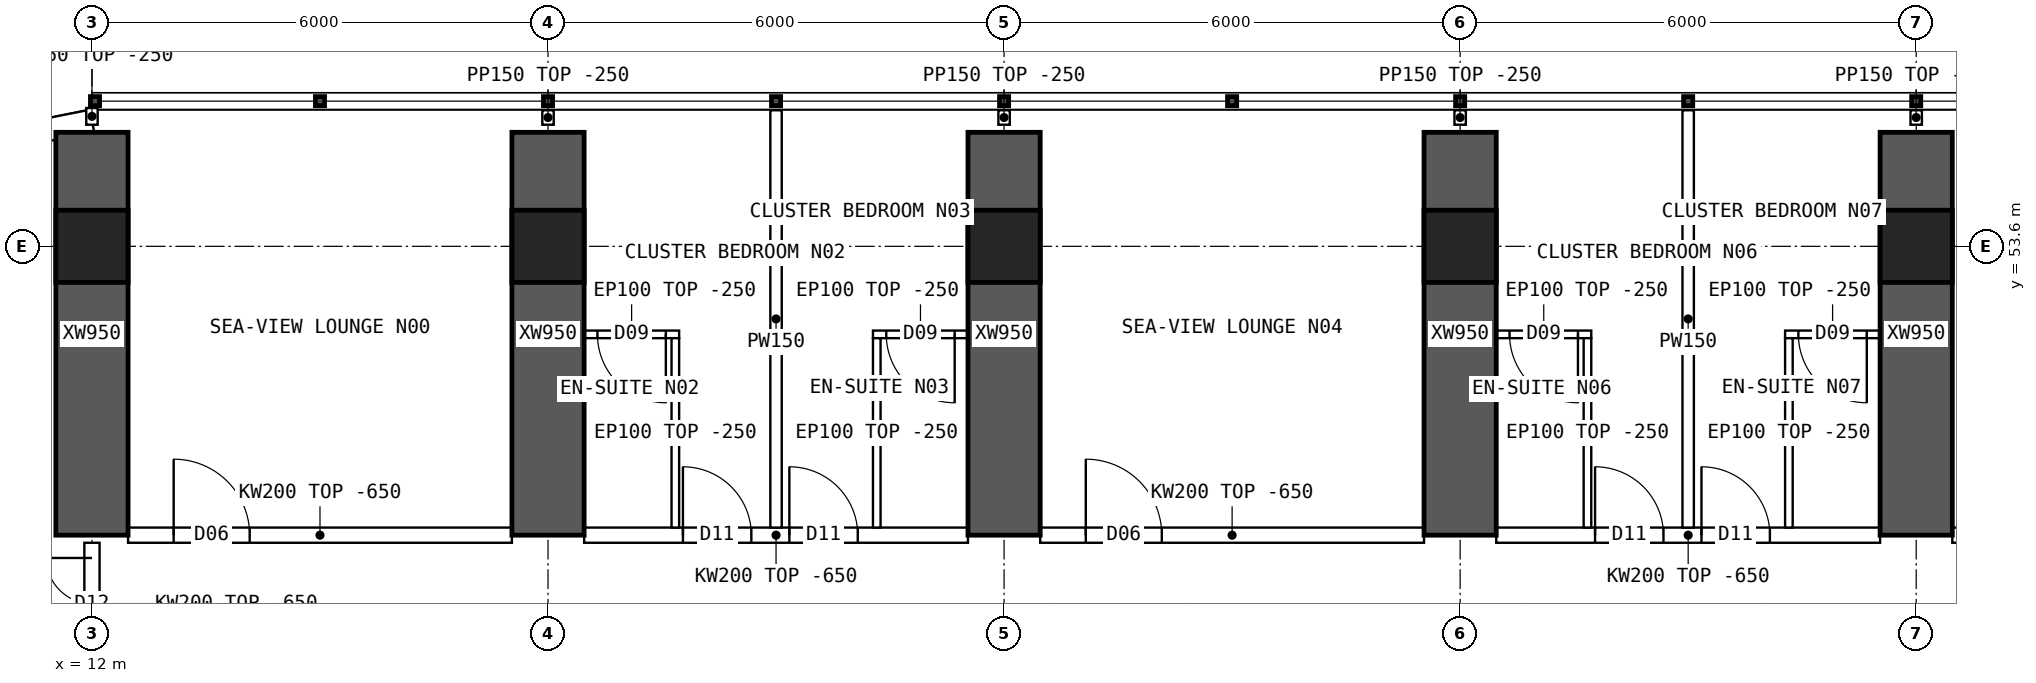
"""IFC4 building model, lengths in metres.
Left out: names, types, materials, properties, quantities, classifications, styles, units other than length and angle.
Written with IfcOpenShell. Run it as: python <this file> out.ifc"""

import sys

from ifc_helpers import new_model, si_unit, direction, frame, frame_2d, origin, origin_2d, place, context, subcontext, project, spatial, polyline, rectangle, hollow_rectangle, outline, extrude, element, fill, save


model = new_model("IFC4")
c1 = context("Model", 3, precision=1e-05, world=origin(), true_north=direction((0.0, 1.0)))
c2 = subcontext(c1, "Body", "Model", "MODEL_VIEW")
j1 = project(units=[si_unit("LENGTHUNIT", "METRE"), si_unit("PLANEANGLEUNIT", "RADIAN")], contexts=[c1])
p1 = place(None, origin())
s1 = spatial("IfcSite", under=j1, at=p1, CompositionType="ELEMENT")
p2 = place(p1, origin())
s2 = spatial("IfcBuilding", under=s1, at=p2, CompositionType="ELEMENT")
p3 = place(p2, frame((0.0, 0.0, 125.65)))
s3 = spatial("IfcBuildingStorey", under=s2, at=p3, CompositionType="ELEMENT", Elevation=125.65)
for number, where, z_axis, x_axis in (
    (1, (12.0, 53.6, 0.0), (0.0, 0.0, 1.0), (1.0, 0.0, 0.0)),
    (2, (18.0, 53.6, 0.0), (0.0, 0.0, 1.0), (1.0, 0.0, 0.0)),
    (3, (24.0, 53.6, 0.0), (0.0, 0.0, 1.0), (1.0, 0.0, 0.0)),
    (4, (30.0, 53.6, 0.0), (0.0, 0.0, 1.0), (1.0, 0.0, 0.0)),
    (5, (36.0, 53.6, 0.0), (0.0, 0.0, 1.0), (1.0, 0.0, 0.0)),
):
    element("IfcColumn", number, at=place(p3, frame(where, z_axis=z_axis, x_axis=x_axis)), inside=s3, PredefinedType="COLUMN", context=c2, shape_type="SweptSolid", body=[
        extrude(hollow_rectangle(XDim=0.95, YDim=0.95, WallThickness=0.095, at=origin_2d()), origin(), (0.0, 0.0, 1.0), 3.75),
    ])
for number, where, z_axis, x_axis in (
    (6, (12.0, 49.8, 0.0), (0.0, 0.0, 1.0), (0.0, 1.0, 0.0)),
    (7, (18.0, 49.8, 0.0), (0.0, 0.0, 1.0), (0.0, 1.0, 0.0)),
    (8, (24.0, 49.8, 0.0), (0.0, 0.0, 1.0), (0.0, 1.0, 0.0)),
    (9, (30.0, 49.8, 0.0), (0.0, 0.0, 1.0), (0.0, 1.0, 0.0)),
    (10, (36.0, 49.8, 0.0), (0.0, 0.0, 1.0), (0.0, 1.0, 0.0)),
):
    element("IfcWall", number, at=place(p3, frame(where, z_axis=z_axis, x_axis=x_axis)), inside=s3, PredefinedType="SHEAR", context=c2, shape_type="SweptSolid", body=[
        extrude(rectangle(XDim=5.3, YDim=0.95, at=frame_2d((2.65, 0.0))), origin(), (0.0, 0.0, 1.0), 3.75),
    ])
p4 = place(p3, frame((12.0, 55.25, 0.0), z_axis=(0.0, 0.0, 1.0), x_axis=(-0.980787251524, -0.195080412259, 0.0)))
e11 = element("IfcWall", 11, at=p4, inside=s3, PredefinedType="SOLIDWALL", context=c2, shape_type="SweptSolid", body=[
    extrude(outline(polyline([(-0.03, -0.15), (3.249, -0.15), (3.189, 0.15), (0.03, 0.15), (-0.03, -0.15)])), origin(), (0.0, 0.0, 1.0), 3.5),
])
p5 = place(p4, frame((0.909, 0.0, 0.9)))
e12 = element("IfcOpeningElement", 12, at=p5, cuts=e11, PredefinedType="OPENING", context=c2, shape_type="SweptSolid", body=[
    extrude(rectangle(XDim=1.4, YDim=1.8, at=frame_2d((0.7, 0.9))), frame((0.0, 0.16, 0.0), z_axis=(0.0, -1.0, 0.0), x_axis=(1.0, 0.0, 0.0)), (0.0, 0.0, 1.0), 0.32),
])
p6 = place(p3, frame((12.475, 49.8, 0.0), z_axis=(0.0, 0.0, 1.0), x_axis=(1.0, 0.0, 0.0)))
e13 = element("IfcWall", 13, at=p6, inside=s3, PredefinedType="SOLIDWALL", context=c2, shape_type="SweptSolid", body=[
    extrude(outline(polyline([(0.0, 0.0), (5.05, 0.0), (5.05, 3.1), (0.0, 3.1), (0.0, 0.0)])), frame((0.0, 0.1, 0.0), z_axis=(0.0, -1.0, 0.0), x_axis=(1.0, 0.0, 0.0)), (0.0, 0.0, 1.0), 0.2),
])
p7 = place(p6, frame((0.6, 0.0, 0.0)))
e14 = element("IfcOpeningElement", 14, at=p7, cuts=e13, PredefinedType="OPENING", context=c2, shape_type="SweptSolid", body=[
    extrude(rectangle(XDim=1.0, YDim=2.1, at=frame_2d((0.5, 1.05))), frame((0.0, 0.11, 0.0), z_axis=(0.0, -1.0, 0.0), x_axis=(1.0, 0.0, 0.0)), (0.0, 0.0, 1.0), 0.22),
])
p8 = place(p3, frame((18.475, 49.8, 0.0), z_axis=(0.0, 0.0, 1.0), x_axis=(1.0, 0.0, 0.0)))
e15 = element("IfcWall", 15, at=p8, inside=s3, PredefinedType="SOLIDWALL", context=c2, shape_type="SweptSolid", body=[
    extrude(outline(polyline([(0.0, 0.0), (5.05, 0.0), (5.05, 3.1), (0.0, 3.1), (0.0, 0.0)])), frame((0.0, 0.1, 0.0), z_axis=(0.0, -1.0, 0.0), x_axis=(1.0, 0.0, 0.0)), (0.0, 0.0, 1.0), 0.2),
])
p9 = place(p8, frame((1.3, 0.0, 0.0)))
e16 = element("IfcOpeningElement", 16, at=p9, cuts=e15, PredefinedType="OPENING", context=c2, shape_type="SweptSolid", body=[
    extrude(rectangle(XDim=0.9, YDim=2.1, at=frame_2d((0.45, 1.05))), frame((0.0, 0.11, 0.0), z_axis=(0.0, -1.0, 0.0), x_axis=(1.0, 0.0, 0.0)), (0.0, 0.0, 1.0), 0.22),
])
p10 = place(p8, frame((2.7, 0.0, 0.0)))
e17 = element("IfcOpeningElement", 17, at=p10, cuts=e15, PredefinedType="OPENING", context=c2, shape_type="SweptSolid", body=[
    extrude(rectangle(XDim=0.9, YDim=2.1, at=frame_2d((0.45, 1.05))), frame((0.0, 0.11, 0.0), z_axis=(0.0, -1.0, 0.0), x_axis=(1.0, 0.0, 0.0)), (0.0, 0.0, 1.0), 0.22),
])
p11 = place(p3, frame((24.475, 49.8, 0.0), z_axis=(0.0, 0.0, 1.0), x_axis=(1.0, 0.0, 0.0)))
e18 = element("IfcWall", 18, at=p11, inside=s3, PredefinedType="SOLIDWALL", context=c2, shape_type="SweptSolid", body=[
    extrude(outline(polyline([(0.0, 0.0), (5.05, 0.0), (5.05, 3.1), (0.0, 3.1), (0.0, 0.0)])), frame((0.0, 0.1, 0.0), z_axis=(0.0, -1.0, 0.0), x_axis=(1.0, 0.0, 0.0)), (0.0, 0.0, 1.0), 0.2),
])
p12 = place(p11, frame((0.6, 0.0, 0.0)))
e19 = element("IfcOpeningElement", 19, at=p12, cuts=e18, PredefinedType="OPENING", context=c2, shape_type="SweptSolid", body=[
    extrude(rectangle(XDim=1.0, YDim=2.1, at=frame_2d((0.5, 1.05))), frame((0.0, 0.11, 0.0), z_axis=(0.0, -1.0, 0.0), x_axis=(1.0, 0.0, 0.0)), (0.0, 0.0, 1.0), 0.22),
])
p13 = place(p3, frame((30.475, 49.8, 0.0), z_axis=(0.0, 0.0, 1.0), x_axis=(1.0, 0.0, 0.0)))
e20 = element("IfcWall", 20, at=p13, inside=s3, PredefinedType="SOLIDWALL", context=c2, shape_type="SweptSolid", body=[
    extrude(outline(polyline([(0.0, 0.0), (5.05, 0.0), (5.05, 3.1), (0.0, 3.1), (0.0, 0.0)])), frame((0.0, 0.1, 0.0), z_axis=(0.0, -1.0, 0.0), x_axis=(1.0, 0.0, 0.0)), (0.0, 0.0, 1.0), 0.2),
])
p14 = place(p13, frame((1.3, 0.0, 0.0)))
e21 = element("IfcOpeningElement", 21, at=p14, cuts=e20, PredefinedType="OPENING", context=c2, shape_type="SweptSolid", body=[
    extrude(rectangle(XDim=0.9, YDim=2.1, at=frame_2d((0.45, 1.05))), frame((0.0, 0.11, 0.0), z_axis=(0.0, -1.0, 0.0), x_axis=(1.0, 0.0, 0.0)), (0.0, 0.0, 1.0), 0.22),
])
p15 = place(p13, frame((2.7, 0.0, 0.0)))
e22 = element("IfcOpeningElement", 22, at=p15, cuts=e20, PredefinedType="OPENING", context=c2, shape_type="SweptSolid", body=[
    extrude(rectangle(XDim=0.9, YDim=2.1, at=frame_2d((0.45, 1.05))), frame((0.0, 0.11, 0.0), z_axis=(0.0, -1.0, 0.0), x_axis=(1.0, 0.0, 0.0)), (0.0, 0.0, 1.0), 0.22),
])
p16 = place(p3, frame((36.475, 49.8, 0.0), z_axis=(0.0, 0.0, 1.0), x_axis=(1.0, 0.0, 0.0)))
e23 = element("IfcWall", 23, at=p16, inside=s3, PredefinedType="SOLIDWALL", context=c2, shape_type="SweptSolid", body=[
    extrude(outline(polyline([(0.0, 0.0), (5.05, 0.0), (5.05, 3.1), (0.0, 3.1), (0.0, 0.0)])), frame((0.0, 0.1, 0.0), z_axis=(0.0, -1.0, 0.0), x_axis=(1.0, 0.0, 0.0)), (0.0, 0.0, 1.0), 0.2),
])
p17 = place(p16, frame((0.3, 0.0, 0.0)))
e24 = element("IfcOpeningElement", 24, at=p17, cuts=e23, PredefinedType="OPENING", context=c2, shape_type="SweptSolid", body=[
    extrude(rectangle(XDim=1.0, YDim=2.1, at=frame_2d((0.5, 1.05))), frame((0.0, 0.11, 0.0), z_axis=(0.0, -1.0, 0.0), x_axis=(1.0, 0.0, 0.0)), (0.0, 0.0, 1.0), 0.22),
])
p18 = place(p3, frame((21.0, 55.39, 0.0), z_axis=(0.0, 0.0, 1.0), x_axis=(0.0, -1.0, 0.0)))
e25 = element("IfcWall", 25, at=p18, inside=s3, PredefinedType="PARTITIONING", context=c2, shape_type="SweptSolid", body=[
    extrude(outline(polyline([(0.0, 0.0), (5.49, 0.0), (5.49, 3.1), (5.442, 3.1), (5.44, 3.5), (1.992, 3.5), (1.99, 3.1), (1.592, 3.1), (1.59, 3.5), (0.0, 3.5), (0.0, 0.0)])), frame((0.0, 0.075, 0.0), z_axis=(0.0, -1.0, 0.0), x_axis=(1.0, 0.0, 0.0)), (0.0, 0.0, 1.0), 0.15),
])
p19 = place(p3, frame((18.475, 52.442, 0.0), z_axis=(0.0, 0.0, 1.0), x_axis=(1.0, 0.0, 0.0)))
e26 = element("IfcWall", 26, at=p19, inside=s3, PredefinedType="PARTITIONING", context=c2, shape_type="SweptSolid", body=[
    extrude(rectangle(XDim=1.25, YDim=0.1, at=frame_2d((0.625, 0.0))), origin(), (0.0, 0.0, 1.0), 3.5),
])
p20 = place(p19, frame((0.175, 0.0, 0.0)))
e27 = element("IfcOpeningElement", 27, at=p20, cuts=e26, PredefinedType="OPENING", context=c2, shape_type="SweptSolid", body=[
    extrude(rectangle(XDim=0.9, YDim=2.1, at=frame_2d((0.45, 1.05))), frame((0.0, 0.06, 0.0), z_axis=(0.0, -1.0, 0.0), x_axis=(1.0, 0.0, 0.0)), (0.0, 0.0, 1.0), 0.12),
])
p21 = place(p3, frame((19.675, 52.392, 0.0), z_axis=(0.0, 0.0, 1.0), x_axis=(0.0, -1.0, 0.0)))
e28 = element("IfcWall", 28, at=p21, inside=s3, PredefinedType="PARTITIONING", context=c2, shape_type="SweptSolid", body=[
    extrude(outline(polyline([(0.0, 0.0), (2.492, 0.0), (2.492, 3.1), (2.444, 3.1), (2.442, 3.5), (0.0, 3.5), (0.0, 0.0)])), frame((0.0, 0.05, 0.0), z_axis=(0.0, -1.0, 0.0), x_axis=(1.0, 0.0, 0.0)), (0.0, 0.0, 1.0), 0.1),
])
p22 = place(p3, frame((22.275, 52.442, 0.0), z_axis=(0.0, 0.0, 1.0), x_axis=(1.0, 0.0, 0.0)))
e29 = element("IfcWall", 29, at=p22, inside=s3, PredefinedType="PARTITIONING", context=c2, shape_type="SweptSolid", body=[
    extrude(rectangle(XDim=1.25, YDim=0.1, at=frame_2d((0.625, 0.0))), origin(), (0.0, 0.0, 1.0), 3.5),
])
p23 = place(p22, frame((0.175, 0.0, 0.0)))
e30 = element("IfcOpeningElement", 30, at=p23, cuts=e29, PredefinedType="OPENING", context=c2, shape_type="SweptSolid", body=[
    extrude(rectangle(XDim=0.9, YDim=2.1, at=frame_2d((0.45, 1.05))), frame((0.0, 0.06, 0.0), z_axis=(0.0, -1.0, 0.0), x_axis=(1.0, 0.0, 0.0)), (0.0, 0.0, 1.0), 0.12),
])
p24 = place(p3, frame((22.325, 52.392, 0.0), z_axis=(0.0, 0.0, 1.0), x_axis=(0.0, -1.0, 0.0)))
e31 = element("IfcWall", 31, at=p24, inside=s3, PredefinedType="PARTITIONING", context=c2, shape_type="SweptSolid", body=[
    extrude(outline(polyline([(0.0, 0.0), (2.492, 0.0), (2.492, 3.1), (2.444, 3.1), (2.442, 3.5), (0.0, 3.5), (0.0, 0.0)])), frame((0.0, 0.05, 0.0), z_axis=(0.0, -1.0, 0.0), x_axis=(1.0, 0.0, 0.0)), (0.0, 0.0, 1.0), 0.1),
])
p25 = place(p3, frame((33.0, 55.39, 0.0), z_axis=(0.0, 0.0, 1.0), x_axis=(0.0, -1.0, 0.0)))
e32 = element("IfcWall", 32, at=p25, inside=s3, PredefinedType="PARTITIONING", context=c2, shape_type="SweptSolid", body=[
    extrude(outline(polyline([(0.0, 0.0), (5.49, 0.0), (5.49, 3.1), (5.442, 3.1), (5.44, 3.5), (1.992, 3.5), (1.99, 3.1), (1.592, 3.1), (1.59, 3.5), (0.0, 3.5), (0.0, 0.0)])), frame((0.0, 0.075, 0.0), z_axis=(0.0, -1.0, 0.0), x_axis=(1.0, 0.0, 0.0)), (0.0, 0.0, 1.0), 0.15),
])
p26 = place(p3, frame((30.475, 52.442, 0.0), z_axis=(0.0, 0.0, 1.0), x_axis=(1.0, 0.0, 0.0)))
e33 = element("IfcWall", 33, at=p26, inside=s3, PredefinedType="PARTITIONING", context=c2, shape_type="SweptSolid", body=[
    extrude(rectangle(XDim=1.25, YDim=0.1, at=frame_2d((0.625, 0.0))), origin(), (0.0, 0.0, 1.0), 3.5),
])
p27 = place(p26, frame((0.175, 0.0, 0.0)))
e34 = element("IfcOpeningElement", 34, at=p27, cuts=e33, PredefinedType="OPENING", context=c2, shape_type="SweptSolid", body=[
    extrude(rectangle(XDim=0.9, YDim=2.1, at=frame_2d((0.45, 1.05))), frame((0.0, 0.06, 0.0), z_axis=(0.0, -1.0, 0.0), x_axis=(1.0, 0.0, 0.0)), (0.0, 0.0, 1.0), 0.12),
])
p28 = place(p3, frame((31.675, 52.392, 0.0), z_axis=(0.0, 0.0, 1.0), x_axis=(0.0, -1.0, 0.0)))
e35 = element("IfcWall", 35, at=p28, inside=s3, PredefinedType="PARTITIONING", context=c2, shape_type="SweptSolid", body=[
    extrude(outline(polyline([(0.0, 0.0), (2.492, 0.0), (2.492, 3.1), (2.444, 3.1), (2.442, 3.5), (0.0, 3.5), (0.0, 0.0)])), frame((0.0, 0.05, 0.0), z_axis=(0.0, -1.0, 0.0), x_axis=(1.0, 0.0, 0.0)), (0.0, 0.0, 1.0), 0.1),
])
p29 = place(p3, frame((34.275, 52.442, 0.0), z_axis=(0.0, 0.0, 1.0), x_axis=(1.0, 0.0, 0.0)))
e36 = element("IfcWall", 36, at=p29, inside=s3, PredefinedType="PARTITIONING", context=c2, shape_type="SweptSolid", body=[
    extrude(rectangle(XDim=1.25, YDim=0.1, at=frame_2d((0.625, 0.0))), origin(), (0.0, 0.0, 1.0), 3.5),
])
p30 = place(p29, frame((0.175, 0.0, 0.0)))
e37 = element("IfcOpeningElement", 37, at=p30, cuts=e36, PredefinedType="OPENING", context=c2, shape_type="SweptSolid", body=[
    extrude(rectangle(XDim=0.9, YDim=2.1, at=frame_2d((0.45, 1.05))), frame((0.0, 0.06, 0.0), z_axis=(0.0, -1.0, 0.0), x_axis=(1.0, 0.0, 0.0)), (0.0, 0.0, 1.0), 0.12),
])
p31 = place(p3, frame((34.325, 52.392, 0.0), z_axis=(0.0, 0.0, 1.0), x_axis=(0.0, -1.0, 0.0)))
e38 = element("IfcWall", 38, at=p31, inside=s3, PredefinedType="PARTITIONING", context=c2, shape_type="SweptSolid", body=[
    extrude(outline(polyline([(0.0, 0.0), (2.492, 0.0), (2.492, 3.1), (2.444, 3.1), (2.442, 3.5), (0.0, 3.5), (0.0, 0.0)])), frame((0.0, 0.05, 0.0), z_axis=(0.0, -1.0, 0.0), x_axis=(1.0, 0.0, 0.0)), (0.0, 0.0, 1.0), 0.1),
])
p32 = place(p3, frame((12.0, 48.1, 0.0), z_axis=(0.0, 0.0, 1.0), x_axis=(0.0, 1.0, 0.0)))
e39 = element("IfcWall", 39, at=p32, inside=s3, PredefinedType="SOLIDWALL", context=c2, shape_type="SweptSolid", body=[
    extrude(outline(polyline([(0.0, 0.0), (1.6, 0.0), (1.6, 3.1), (0.0, 3.1), (0.0, 0.0)])), frame((0.0, 0.1, 0.0), z_axis=(0.0, -1.0, 0.0), x_axis=(1.0, 0.0, 0.0)), (0.0, 0.0, 1.0), 0.2),
])
p33 = place(p32, frame((0.2, 0.0, 0.0)))
e40 = element("IfcOpeningElement", 40, at=p33, cuts=e39, PredefinedType="OPENING", context=c2, shape_type="SweptSolid", body=[
    extrude(rectangle(XDim=1.2, YDim=2.1, at=frame_2d((0.6, 1.05))), frame((0.0, 0.11, 0.0), z_axis=(0.0, -1.0, 0.0), x_axis=(1.0, 0.0, 0.0)), (0.0, 0.0, 1.0), 0.22),
])
p34 = place(p3, frame((12.0, 55.2, 0.0), z_axis=(0.0, 0.0, 1.0), x_axis=(0.0, 1.0, 0.0)))
e41 = element("IfcWall", 41, at=p34, inside=s3, PredefinedType="PARTITIONING", context=c2, shape_type="SweptSolid", body=[
    extrude(rectangle(XDim=0.22, YDim=0.15, at=frame_2d((0.11, 0.0))), origin(), (0.0, 0.0, 1.0), 3.5),
])
for number, where, z_axis, x_axis in (
    (42, (18.0, 55.2, 0.0), (0.0, 0.0, 1.0), (0.0, 1.0, 0.0)),
    (43, (24.0, 55.2, 0.0), (0.0, 0.0, 1.0), (0.0, 1.0, 0.0)),
    (44, (30.0, 55.2, 0.0), (0.0, 0.0, 1.0), (0.0, 1.0, 0.0)),
    (45, (36.0, 55.2, 0.0), (0.0, 0.0, 1.0), (0.0, 1.0, 0.0)),
):
    element("IfcWall", number, at=place(p3, frame(where, z_axis=z_axis, x_axis=x_axis)), inside=s3, PredefinedType="PARTITIONING", context=c2, shape_type="SweptSolid", body=[
        extrude(rectangle(XDim=0.19, YDim=0.15, at=frame_2d((0.095, 0.0))), origin(), (0.0, 0.0, 1.0), 3.5),
    ])
p35 = place(p7, origin())
e46 = element("IfcDoor", 46, at=p35, inside=s3, OperationType="SINGLE_SWING_LEFT", PredefinedType="DOOR", context=c2, shape_type="SweptSolid", body=[
    extrude(rectangle(XDim=1.0, YDim=2.1, at=frame_2d((0.5, 1.05))), frame((0.0, 0.025, 0.0), z_axis=(0.0, -1.0, 0.0), x_axis=(1.0, 0.0, 0.0)), (0.0, 0.0, 1.0), 0.05),
])
fill(e14, e46)
p36 = place(p20, origin())
e47 = element("IfcDoor", 47, at=p36, inside=s3, OperationType="SINGLE_SWING_RIGHT", PredefinedType="DOOR", context=c2, shape_type="SweptSolid", body=[
    extrude(rectangle(XDim=0.9, YDim=2.1, at=frame_2d((0.45, 1.05))), frame((0.0, 0.025, 0.0), z_axis=(0.0, -1.0, 0.0), x_axis=(1.0, 0.0, 0.0)), (0.0, 0.0, 1.0), 0.05),
])
fill(e27, e47)
p37 = place(p9, origin())
e48 = element("IfcDoor", 48, at=p37, inside=s3, OperationType="SINGLE_SWING_LEFT", PredefinedType="DOOR", context=c2, shape_type="SweptSolid", body=[
    extrude(rectangle(XDim=0.9, YDim=2.1, at=frame_2d((0.45, 1.05))), frame((0.0, 0.025, 0.0), z_axis=(0.0, -1.0, 0.0), x_axis=(1.0, 0.0, 0.0)), (0.0, 0.0, 1.0), 0.05),
])
fill(e16, e48)
p38 = place(p23, origin())
e49 = element("IfcDoor", 49, at=p38, inside=s3, OperationType="SINGLE_SWING_RIGHT", PredefinedType="DOOR", context=c2, shape_type="SweptSolid", body=[
    extrude(rectangle(XDim=0.9, YDim=2.1, at=frame_2d((0.45, 1.05))), frame((0.0, 0.025, 0.0), z_axis=(0.0, -1.0, 0.0), x_axis=(1.0, 0.0, 0.0)), (0.0, 0.0, 1.0), 0.05),
])
fill(e30, e49)
p39 = place(p10, origin())
e50 = element("IfcDoor", 50, at=p39, inside=s3, OperationType="SINGLE_SWING_LEFT", PredefinedType="DOOR", context=c2, shape_type="SweptSolid", body=[
    extrude(rectangle(XDim=0.9, YDim=2.1, at=frame_2d((0.45, 1.05))), frame((0.0, 0.025, 0.0), z_axis=(0.0, -1.0, 0.0), x_axis=(1.0, 0.0, 0.0)), (0.0, 0.0, 1.0), 0.05),
])
fill(e17, e50)
p40 = place(p12, origin())
e51 = element("IfcDoor", 51, at=p40, inside=s3, OperationType="SINGLE_SWING_LEFT", PredefinedType="DOOR", context=c2, shape_type="SweptSolid", body=[
    extrude(rectangle(XDim=1.0, YDim=2.1, at=frame_2d((0.5, 1.05))), frame((0.0, 0.025, 0.0), z_axis=(0.0, -1.0, 0.0), x_axis=(1.0, 0.0, 0.0)), (0.0, 0.0, 1.0), 0.05),
])
fill(e19, e51)
p41 = place(p27, origin())
e52 = element("IfcDoor", 52, at=p41, inside=s3, OperationType="SINGLE_SWING_RIGHT", PredefinedType="DOOR", context=c2, shape_type="SweptSolid", body=[
    extrude(rectangle(XDim=0.9, YDim=2.1, at=frame_2d((0.45, 1.05))), frame((0.0, 0.025, 0.0), z_axis=(0.0, -1.0, 0.0), x_axis=(1.0, 0.0, 0.0)), (0.0, 0.0, 1.0), 0.05),
])
fill(e34, e52)
p42 = place(p14, origin())
e53 = element("IfcDoor", 53, at=p42, inside=s3, OperationType="SINGLE_SWING_LEFT", PredefinedType="DOOR", context=c2, shape_type="SweptSolid", body=[
    extrude(rectangle(XDim=0.9, YDim=2.1, at=frame_2d((0.45, 1.05))), frame((0.0, 0.025, 0.0), z_axis=(0.0, -1.0, 0.0), x_axis=(1.0, 0.0, 0.0)), (0.0, 0.0, 1.0), 0.05),
])
fill(e21, e53)
p43 = place(p30, origin())
e54 = element("IfcDoor", 54, at=p43, inside=s3, OperationType="SINGLE_SWING_RIGHT", PredefinedType="DOOR", context=c2, shape_type="SweptSolid", body=[
    extrude(rectangle(XDim=0.9, YDim=2.1, at=frame_2d((0.45, 1.05))), frame((0.0, 0.025, 0.0), z_axis=(0.0, -1.0, 0.0), x_axis=(1.0, 0.0, 0.0)), (0.0, 0.0, 1.0), 0.05),
])
fill(e37, e54)
p44 = place(p15, origin())
e55 = element("IfcDoor", 55, at=p44, inside=s3, OperationType="SINGLE_SWING_LEFT", PredefinedType="DOOR", context=c2, shape_type="SweptSolid", body=[
    extrude(rectangle(XDim=0.9, YDim=2.1, at=frame_2d((0.45, 1.05))), frame((0.0, 0.025, 0.0), z_axis=(0.0, -1.0, 0.0), x_axis=(1.0, 0.0, 0.0)), (0.0, 0.0, 1.0), 0.05),
])
fill(e22, e55)
p45 = place(p33, origin())
e56 = element("IfcDoor", 56, at=p45, inside=s3, OperationType="DOUBLE_DOOR_SINGLE_SWING", PredefinedType="DOOR", context=c2, shape_type="SweptSolid", body=[
    extrude(rectangle(XDim=1.2, YDim=2.1, at=frame_2d((0.6, 1.05))), frame((0.0, 0.025, 0.0), z_axis=(0.0, -1.0, 0.0), x_axis=(1.0, 0.0, 0.0)), (0.0, 0.0, 1.0), 0.05),
])
fill(e40, e56)
save(model, sys.argv[1])
